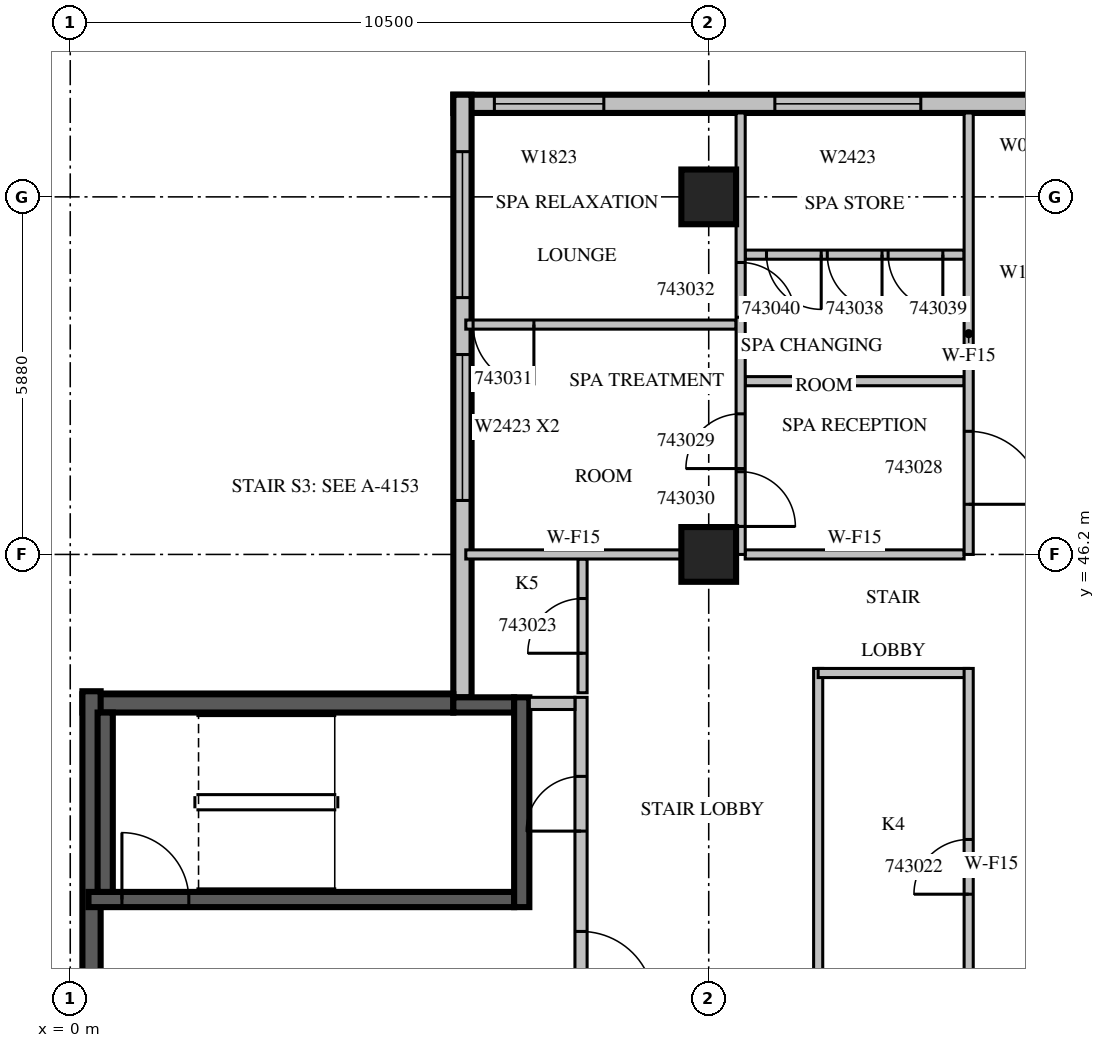
"""IFC4 building model, lengths in metres.
Left out: names, types, materials, properties, quantities, classifications, styles, units other than length and angle.
Written with IfcOpenShell. Run it as: python <this file> out.ifc"""

import sys

from ifc_helpers import new_model, si_unit, direction, frame, frame_2d, origin, origin_2d, place, context, subcontext, project, spatial, rectangle, extrude, source, transform, mapped, element, fill, save


model = new_model("IFC4")
c1 = context("Model", 3, precision=1e-05, world=origin(), true_north=direction((0.0, 1.0)))
c2 = subcontext(c1, "Body", "Model", "MODEL_VIEW")
j1 = project(units=[si_unit("LENGTHUNIT", "METRE"), si_unit("PLANEANGLEUNIT", "RADIAN")], contexts=[c1])
p1 = place(None, origin())
s1 = spatial("IfcSite", under=j1, at=p1, CompositionType="ELEMENT")
p2 = place(p1, origin())
s2 = spatial("IfcBuilding", under=s1, at=p2, CompositionType="ELEMENT")
p3 = place(p2, frame((0.0, 0.0, 196.8)))
s3 = spatial("IfcBuildingStorey", under=s2, at=p3, CompositionType="ELEMENT", Elevation=196.8)
m1 = source(origin(), c2, "Body", "SweptSolid", [
    extrude(rectangle(XDim=0.9, YDim=0.9, at=origin_2d()), origin(), (0.0, 0.0, 1.0), 3.8),
])
for number, where, z_axis, x_axis in (
    (1, (10.5, 46.2, 0.0), (0.0, 0.0, 1.0), (1.0, 0.0, 0.0)),
    (2, (10.5, 52.08, 0.0), (0.0, 0.0, 1.0), (1.0, 0.0, 0.0)),
):
    element("IfcColumn", number, at=place(p3, frame(where, z_axis=z_axis, x_axis=x_axis)), inside=s3, PredefinedType="COLUMN", context=c2, shape_type="MappedRepresentation", body=[
        mapped(m1, transform((0.0, 0.0, 0.0), scale=1.0)),
    ])
m2 = source(origin(), c2, "Body", "SweptSolid", [
    extrude(rectangle(XDim=10.5, YDim=0.3, at=frame_2d((5.25, 0.0))), origin(), (0.0, 0.0, 1.0), 3.4),
])
p4 = place(p3, frame((16.8, 53.61, 0.0), z_axis=(0.0, 0.0, 1.0), x_axis=(-1.0, 0.0, 0.0)))
e3 = element("IfcWall", 3, at=p4, inside=s3, PredefinedType="STANDARD", context=c2, shape_type="MappedRepresentation", body=[
    mapped(m2, transform((0.0, 0.0, 0.0), scale=1.0)),
])
m3 = source(origin(), c2, "Body", "SweptSolid", [
    extrude(rectangle(XDim=1.8, YDim=2.3, at=frame_2d((0.9, 1.15))), frame((0.0, 0.16, 0.0), z_axis=(0.0, -1.0, 0.0), x_axis=(1.0, 0.0, 0.0)), (0.0, 0.0, 1.0), 0.32),
])
p5 = place(p4, frame((8.025, 0.0, 0.6)))
e4 = element("IfcOpeningElement", 4, at=p5, cuts=e3, PredefinedType="OPENING", context=c2, shape_type="MappedRepresentation", body=[
    mapped(m3, transform((0.0, 0.0, 0.0), scale=1.0)),
])
m4 = source(origin(), c2, "Body", "SweptSolid", [
    extrude(rectangle(XDim=2.4, YDim=2.3, at=frame_2d((1.2, 1.15))), frame((0.0, 0.16, 0.0), z_axis=(0.0, -1.0, 0.0), x_axis=(1.0, 0.0, 0.0)), (0.0, 0.0, 1.0), 0.32),
])
p6 = place(p4, frame((2.812, 0.0, 0.6)))
e5 = element("IfcOpeningElement", 5, at=p6, cuts=e3, PredefinedType="OPENING", context=c2, shape_type="MappedRepresentation", body=[
    mapped(m4, transform((0.0, 0.0, 0.0), scale=1.0)),
])
m5 = source(origin(), c2, "Body", "SweptSolid", [
    extrude(rectangle(XDim=9.91, YDim=0.3, at=frame_2d((4.955, 0.0))), origin(), (0.0, 0.0, 1.0), 3.4),
])
p7 = place(p3, frame((6.45, 53.76, 0.0), z_axis=(0.0, 0.0, 1.0), x_axis=(0.0, -1.0, 0.0)))
e6 = element("IfcWall", 6, at=p7, inside=s3, PredefinedType="STANDARD", context=c2, shape_type="MappedRepresentation", body=[
    mapped(m5, transform((0.0, 0.0, 0.0), scale=1.0)),
])
p8 = place(p7, frame((4.272, 0.0, 0.6)))
e7 = element("IfcOpeningElement", 7, at=p8, cuts=e6, PredefinedType="OPENING", context=c2, shape_type="MappedRepresentation", body=[
    mapped(m4, transform((0.0, 0.0, 0.0), scale=1.0)),
])
p9 = place(p7, frame((0.936, 0.0, 0.6)))
e8 = element("IfcOpeningElement", 8, at=p9, cuts=e6, PredefinedType="OPENING", context=c2, shape_type="MappedRepresentation", body=[
    mapped(m4, transform((0.0, 0.0, 0.0), scale=1.0)),
])
m6 = source(origin(), c2, "Body", "SweptSolid", [
    extrude(rectangle(XDim=6.1, YDim=0.3, at=frame_2d((3.05, 0.0))), origin(), (0.0, 0.0, 1.0), 3.4),
])
p10 = place(p3, frame((6.3, 43.75, 0.0), z_axis=(0.0, 0.0, 1.0), x_axis=(-1.0, 0.0, 0.0)))
e9 = element("IfcWall", 9, at=p10, inside=s3, PredefinedType="SOLIDWALL", context=c2, shape_type="MappedRepresentation", body=[
    mapped(m6, transform((0.0, 0.0, 0.0), scale=1.0)),
])
m7 = source(origin(), c2, "Body", "SweptSolid", [
    extrude(rectangle(XDim=5.65, YDim=0.3, at=frame_2d((2.825, 0.0))), origin(), (0.0, 0.0, 1.0), 3.4),
])
p11 = place(p3, frame((0.35, 43.95, 0.0), z_axis=(0.0, 0.0, 1.0), x_axis=(0.0, -1.0, 0.0)))
e10 = element("IfcWall", 10, at=p11, inside=s3, PredefinedType="SOLIDWALL", context=c2, shape_type="MappedRepresentation", body=[
    mapped(m7, transform((0.0, 0.0, 0.0), scale=1.0)),
])
m8 = source(origin(), c2, "Body", "SweptSolid", [
    extrude(rectangle(XDim=7.0, YDim=0.25, at=frame_2d((3.5, 0.0))), origin(), (0.0, 0.0, 1.0), 3.4),
])
p12 = place(p3, frame((0.3, 40.525, 0.0), z_axis=(0.0, 0.0, 1.0), x_axis=(1.0, 0.0, 0.0)))
e11 = element("IfcWall", 11, at=p12, inside=s3, PredefinedType="SOLIDWALL", context=c2, shape_type="MappedRepresentation", body=[
    mapped(m8, transform((0.0, 0.0, 0.0), scale=1.0)),
])
m9 = source(origin(), c2, "Body", "SweptSolid", [
    extrude(rectangle(XDim=1.1, YDim=2.1, at=frame_2d((0.55, 1.05))), frame((0.0, 0.135, 0.0), z_axis=(0.0, -1.0, 0.0), x_axis=(1.0, 0.0, 0.0)), (0.0, 0.0, 1.0), 0.27),
])
p13 = place(p12, frame((0.55, 0.0, 0.0)))
e12 = element("IfcOpeningElement", 12, at=p13, cuts=e11, PredefinedType="OPENING", context=c2, shape_type="MappedRepresentation", body=[
    mapped(m9, transform((0.0, 0.0, 0.0), scale=1.0)),
])
m10 = source(origin(), c2, "Body", "SweptSolid", [
    extrude(rectangle(XDim=1.0, YDim=0.25, at=frame_2d((0.5, 0.0))), origin(), (0.0, 0.0, 1.0), 3.4),
])
p14 = place(p3, frame((6.3, 43.725, 0.0), z_axis=(0.0, 0.0, 1.0), x_axis=(1.0, 0.0, 0.0)))
e13 = element("IfcWall", 13, at=p14, inside=s3, PredefinedType="SOLIDWALL", context=c2, shape_type="MappedRepresentation", body=[
    mapped(m10, transform((0.0, 0.0, 0.0), scale=1.0)),
])
m11 = source(origin(), c2, "Body", "SweptSolid", [
    extrude(rectangle(XDim=3.45, YDim=0.25, at=frame_2d((1.725, 0.0))), origin(), (0.0, 0.0, 1.0), 3.4),
])
p15 = place(p3, frame((7.425, 40.4, 0.0), z_axis=(0.0, 0.0, 1.0), x_axis=(0.0, 1.0, 0.0)))
e14 = element("IfcWall", 14, at=p15, inside=s3, PredefinedType="SOLIDWALL", context=c2, shape_type="MappedRepresentation", body=[
    mapped(m11, transform((0.0, 0.0, 0.0), scale=1.0)),
])
m12 = source(origin(), c2, "Body", "SweptSolid", [
    extrude(rectangle(XDim=2.95, YDim=0.25, at=frame_2d((1.475, 0.0))), origin(), (0.0, 0.0, 1.0), 3.4),
])
p16 = place(p3, frame((0.575, 40.65, 0.0), z_axis=(0.0, 0.0, 1.0), x_axis=(0.0, 1.0, 0.0)))
e15 = element("IfcWall", 15, at=p16, inside=s3, PredefinedType="SOLIDWALL", context=c2, shape_type="MappedRepresentation", body=[
    mapped(m12, transform((0.0, 0.0, 0.0), scale=1.0)),
])
m13 = source(origin(), c2, "Body", "SweptSolid", [
    extrude(rectangle(XDim=5.45, YDim=0.2, at=frame_2d((2.725, 0.0))), origin(), (0.0, 0.0, 1.0), 3.4),
])
p17 = place(p3, frame((8.4, 38.4, 0.0), z_axis=(0.0, 0.0, 1.0), x_axis=(0.0, 1.0, 0.0)))
e16 = element("IfcWall", 16, at=p17, inside=s3, PredefinedType="PARTITIONING", context=c2, shape_type="MappedRepresentation", body=[
    mapped(m13, transform((0.0, 0.0, 0.0), scale=1.0)),
])
m14 = source(origin(), c2, "Body", "SweptSolid", [
    extrude(rectangle(XDim=1.2, YDim=2.1, at=frame_2d((0.6, 1.05))), frame((0.0, 0.11, 0.0), z_axis=(0.0, -1.0, 0.0), x_axis=(1.0, 0.0, 0.0)), (0.0, 0.0, 1.0), 0.22),
])
p18 = place(p17, frame((0.4, 0.0, 0.0)))
e17 = element("IfcOpeningElement", 17, at=p18, cuts=e16, PredefinedType="OPENING", context=c2, shape_type="MappedRepresentation", body=[
    mapped(m14, transform((0.0, 0.0, 0.0), scale=1.0)),
])
m15 = source(origin(), c2, "Body", "SweptSolid", [
    extrude(rectangle(XDim=0.9, YDim=2.1, at=frame_2d((0.45, 1.05))), frame((0.0, 0.11, 0.0), z_axis=(0.0, -1.0, 0.0), x_axis=(1.0, 0.0, 0.0)), (0.0, 0.0, 1.0), 0.22),
])
p19 = place(p17, frame((3.25, 0.0, 0.0)))
e18 = element("IfcOpeningElement", 18, at=p19, cuts=e16, PredefinedType="OPENING", context=c2, shape_type="MappedRepresentation", body=[
    mapped(m15, transform((0.0, 0.0, 0.0), scale=1.0)),
])
m16 = source(origin(), c2, "Body", "SweptSolid", [
    extrude(rectangle(XDim=0.75, YDim=0.2, at=frame_2d((0.375, 0.0))), origin(), (0.0, 0.0, 1.0), 3.4),
])
p20 = place(p3, frame((7.55, 43.75, 0.0), z_axis=(0.0, 0.0, 1.0), x_axis=(1.0, 0.0, 0.0)))
e19 = element("IfcWall", 19, at=p20, inside=s3, PredefinedType="PARTITIONING", context=c2, shape_type="MappedRepresentation", body=[
    mapped(m16, transform((0.0, 0.0, 0.0), scale=1.0)),
])
m17 = source(origin(), c2, "Body", "SweptSolid", [
    extrude(rectangle(XDim=6.45, YDim=0.15, at=frame_2d((3.225, 0.0))), origin(), (0.0, 0.0, 1.0), 3.4),
])
p21 = place(p3, frame((12.3, 44.325, 0.0), z_axis=(0.0, 0.0, 1.0), x_axis=(0.0, -1.0, 0.0)))
e20 = element("IfcWall", 20, at=p21, inside=s3, PredefinedType="PARTITIONING", context=c2, shape_type="MappedRepresentation", body=[
    mapped(m17, transform((0.0, 0.0, 0.0), scale=1.0)),
])
m18 = source(origin(), c2, "Body", "SweptSolid", [
    extrude(rectangle(XDim=2.475, YDim=0.15, at=frame_2d((1.238, 0.0))), origin(), (0.0, 0.0, 1.0), 3.4),
])
p22 = place(p3, frame((14.775, 44.25, 0.0), z_axis=(0.0, 0.0, 1.0), x_axis=(-1.0, 0.0, 0.0)))
e21 = element("IfcWall", 21, at=p22, inside=s3, PredefinedType="PARTITIONING", context=c2, shape_type="MappedRepresentation", body=[
    mapped(m18, transform((0.0, 0.0, 0.0), scale=1.0)),
])
p23 = place(p3, frame((14.775, 37.875, 0.0), z_axis=(0.0, 0.0, 1.0), x_axis=(0.0, 1.0, 0.0)))
e22 = element("IfcWall", 22, at=p23, inside=s3, PredefinedType="PARTITIONING", context=c2, shape_type="MappedRepresentation", body=[
    mapped(m17, transform((0.0, 0.0, 0.0), scale=1.0)),
])
m19 = source(origin(), c2, "Body", "SweptSolid", [
    extrude(rectangle(XDim=0.9, YDim=2.1, at=frame_2d((0.45, 1.05))), frame((0.0, 0.085, 0.0), z_axis=(0.0, -1.0, 0.0), x_axis=(1.0, 0.0, 0.0)), (0.0, 0.0, 1.0), 0.17),
])
p24 = place(p23, frame((2.737, 0.0, 0.0)))
e23 = element("IfcOpeningElement", 23, at=p24, cuts=e22, PredefinedType="OPENING", context=c2, shape_type="MappedRepresentation", body=[
    mapped(m19, transform((0.0, 0.0, 0.0), scale=1.0)),
])
m20 = source(origin(), c2, "Body", "SweptSolid", [
    extrude(rectangle(XDim=2.2, YDim=0.15, at=frame_2d((1.1, 0.0))), origin(), (0.0, 0.0, 1.0), 3.4),
])
p25 = place(p3, frame((8.425, 43.925, 0.0), z_axis=(0.0, 0.0, 1.0), x_axis=(0.0, 1.0, 0.0)))
e24 = element("IfcWall", 24, at=p25, inside=s3, PredefinedType="PARTITIONING", context=c2, shape_type="MappedRepresentation", body=[
    mapped(m20, transform((0.0, 0.0, 0.0), scale=1.0)),
])
p26 = place(p25, frame((0.65, 0.0, 0.0)))
e25 = element("IfcOpeningElement", 25, at=p26, cuts=e24, PredefinedType="OPENING", context=c2, shape_type="MappedRepresentation", body=[
    mapped(m19, transform((0.0, 0.0, 0.0), scale=1.0)),
])
m21 = source(origin(), c2, "Body", "SweptSolid", [
    extrude(rectangle(XDim=4.445, YDim=0.15, at=frame_2d((2.223, 0.0))), origin(), (0.0, 0.0, 1.0), 3.4),
])
p27 = place(p3, frame((10.95, 49.98, 0.0), z_axis=(0.0, 0.0, 1.0), x_axis=(-1.0, 0.0, 0.0)))
e26 = element("IfcWall", 26, at=p27, inside=s3, PredefinedType="PARTITIONING", context=c2, shape_type="MappedRepresentation", body=[
    mapped(m21, transform((0.0, 0.0, 0.0), scale=1.0)),
])
m22 = source(origin(), c2, "Body", "SweptSolid", [
    extrude(rectangle(XDim=1.0, YDim=2.1, at=frame_2d((0.5, 1.05))), frame((0.0, 0.085, 0.0), z_axis=(0.0, -1.0, 0.0), x_axis=(1.0, 0.0, 0.0)), (0.0, 0.0, 1.0), 0.17),
])
p28 = place(p27, frame((3.325, 0.0, 0.0)))
e27 = element("IfcOpeningElement", 27, at=p28, cuts=e26, PredefinedType="OPENING", context=c2, shape_type="MappedRepresentation", body=[
    mapped(m22, transform((0.0, 0.0, 0.0), scale=1.0)),
])
m23 = source(origin(), c2, "Body", "SweptSolid", [
    extrude(rectangle(XDim=3.6, YDim=0.15, at=frame_2d((1.8, 0.0))), origin(), (0.0, 0.0, 1.0), 3.4),
])
p29 = place(p3, frame((14.7, 49.049, 0.0), z_axis=(0.0, 0.0, 1.0), x_axis=(-1.0, 0.0, 0.0)))
e28 = element("IfcWall", 28, at=p29, inside=s3, PredefinedType="PARTITIONING", context=c2, shape_type="MappedRepresentation", body=[
    mapped(m23, transform((0.0, 0.0, 0.0), scale=1.0)),
])
p30 = place(p3, frame((14.7, 51.13, 0.0), z_axis=(0.0, 0.0, 1.0), x_axis=(-1.0, 0.0, 0.0)))
e29 = element("IfcWall", 29, at=p30, inside=s3, PredefinedType="PARTITIONING", context=c2, shape_type="MappedRepresentation", body=[
    mapped(m23, transform((0.0, 0.0, 0.0), scale=1.0)),
])
p31 = place(p30, frame((1.35, 0.0, 0.0)))
e30 = element("IfcOpeningElement", 30, at=p31, cuts=e29, PredefinedType="OPENING", context=c2, shape_type="MappedRepresentation", body=[
    mapped(m19, transform((0.0, 0.0, 0.0), scale=1.0)),
])
p32 = place(p30, frame((0.35, 0.0, 0.0)))
e31 = element("IfcOpeningElement", 31, at=p32, cuts=e29, PredefinedType="OPENING", context=c2, shape_type="MappedRepresentation", body=[
    mapped(m19, transform((0.0, 0.0, 0.0), scale=1.0)),
])
p33 = place(p30, frame((2.35, 0.0, 0.0)))
e32 = element("IfcOpeningElement", 32, at=p33, cuts=e29, PredefinedType="OPENING", context=c2, shape_type="MappedRepresentation", body=[
    mapped(m19, transform((0.0, 0.0, 0.0), scale=1.0)),
])
m24 = source(origin(), c2, "Body", "SweptSolid", [
    extrude(rectangle(XDim=3.546, YDim=0.15, at=frame_2d((1.773, 0.0))), origin(), (0.0, 0.0, 1.0), 3.4),
])
p34 = place(p3, frame((10.051, 46.2, 0.0), z_axis=(0.0, 0.0, 1.0), x_axis=(-1.0, 0.0, 0.0)))
e33 = element("IfcWall", 33, at=p34, inside=s3, PredefinedType="PARTITIONING", context=c2, shape_type="MappedRepresentation", body=[
    mapped(m24, transform((0.0, 0.0, 0.0), scale=1.0)),
])
p35 = place(p3, frame((14.7, 46.2, 0.0), z_axis=(0.0, 0.0, 1.0), x_axis=(-1.0, 0.0, 0.0)))
e34 = element("IfcWall", 34, at=p35, inside=s3, PredefinedType="PARTITIONING", context=c2, shape_type="MappedRepresentation", body=[
    mapped(m23, transform((0.0, 0.0, 0.0), scale=1.0)),
])
m25 = source(origin(), c2, "Body", "SweptSolid", [
    extrude(rectangle(XDim=7.26, YDim=0.15, at=frame_2d((3.63, 0.0))), origin(), (0.0, 0.0, 1.0), 3.4),
])
p36 = place(p3, frame((11.025, 46.2, 0.0), z_axis=(0.0, 0.0, 1.0), x_axis=(0.0, 1.0, 0.0)))
e35 = element("IfcWall", 35, at=p36, inside=s3, PredefinedType="PARTITIONING", context=c2, shape_type="MappedRepresentation", body=[
    mapped(m25, transform((0.0, 0.0, 0.0), scale=1.0)),
])
p37 = place(p36, frame((1.412, 0.0, 0.0)))
e36 = element("IfcOpeningElement", 36, at=p37, cuts=e35, PredefinedType="OPENING", context=c2, shape_type="MappedRepresentation", body=[
    mapped(m19, transform((0.0, 0.0, 0.0), scale=1.0)),
])
p38 = place(p36, frame((0.46, 0.0, 0.0)))
e37 = element("IfcOpeningElement", 37, at=p38, cuts=e35, PredefinedType="OPENING", context=c2, shape_type="MappedRepresentation", body=[
    mapped(m19, transform((0.0, 0.0, 0.0), scale=1.0)),
])
p39 = place(p36, frame((3.901, 0.0, 0.0)))
e38 = element("IfcOpeningElement", 38, at=p39, cuts=e35, PredefinedType="OPENING", context=c2, shape_type="MappedRepresentation", body=[
    mapped(m19, transform((0.0, 0.0, 0.0), scale=1.0)),
])
p40 = place(p3, frame((14.775, 46.2, 0.0), z_axis=(0.0, 0.0, 1.0), x_axis=(0.0, 1.0, 0.0)))
e39 = element("IfcWall", 39, at=p40, inside=s3, PredefinedType="PARTITIONING", context=c2, shape_type="MappedRepresentation", body=[
    mapped(m25, transform((0.0, 0.0, 0.0), scale=1.0)),
])
m26 = source(origin(), c2, "Body", "SweptSolid", [
    extrude(rectangle(XDim=1.2, YDim=2.1, at=frame_2d((0.6, 1.05))), frame((0.0, 0.085, 0.0), z_axis=(0.0, -1.0, 0.0), x_axis=(1.0, 0.0, 0.0)), (0.0, 0.0, 1.0), 0.17),
])
p41 = place(p40, frame((0.825, 0.0, 0.0)))
e40 = element("IfcOpeningElement", 40, at=p41, cuts=e39, PredefinedType="OPENING", context=c2, shape_type="MappedRepresentation", body=[
    mapped(m26, transform((0.0, 0.0, 0.0), scale=1.0)),
])
m27 = source(origin(), c2, "Body", "SweptSolid", [
    extrude(rectangle(XDim=1.8, YDim=2.3, at=frame_2d((0.9, 1.15))), frame((0.0, 0.03, 0.0), z_axis=(0.0, -1.0, 0.0), x_axis=(1.0, 0.0, 0.0)), (0.0, 0.0, 1.0), 0.06),
])
p42 = place(p5, origin())
e41 = element("IfcWindow", 41, at=p42, inside=s3, PartitioningType="SINGLE_PANEL", PredefinedType="WINDOW", context=c2, shape_type="MappedRepresentation", body=[
    mapped(m27, transform((0.0, 0.0, 0.0), scale=1.0)),
])
fill(e4, e41)
m28 = source(origin(), c2, "Body", "SweptSolid", [
    extrude(rectangle(XDim=2.4, YDim=2.3, at=frame_2d((1.2, 1.15))), frame((0.0, 0.03, 0.0), z_axis=(0.0, -1.0, 0.0), x_axis=(1.0, 0.0, 0.0)), (0.0, 0.0, 1.0), 0.06),
])
p43 = place(p6, origin())
e42 = element("IfcWindow", 42, at=p43, inside=s3, PartitioningType="SINGLE_PANEL", PredefinedType="WINDOW", context=c2, shape_type="MappedRepresentation", body=[
    mapped(m28, transform((0.0, 0.0, 0.0), scale=1.0)),
])
fill(e5, e42)
p44 = place(p8, origin())
e43 = element("IfcWindow", 43, at=p44, inside=s3, PartitioningType="SINGLE_PANEL", PredefinedType="WINDOW", context=c2, shape_type="MappedRepresentation", body=[
    mapped(m28, transform((0.0, 0.0, 0.0), scale=1.0)),
])
fill(e7, e43)
p45 = place(p9, origin())
e44 = element("IfcWindow", 44, at=p45, inside=s3, PartitioningType="SINGLE_PANEL", PredefinedType="WINDOW", context=c2, shape_type="MappedRepresentation", body=[
    mapped(m28, transform((0.0, 0.0, 0.0), scale=1.0)),
])
fill(e8, e44)
m29 = source(origin(), c2, "Body", "SweptSolid", [
    extrude(rectangle(XDim=1.1, YDim=2.1, at=frame_2d((0.55, 1.05))), frame((0.0, 0.025, 0.0), z_axis=(0.0, -1.0, 0.0), x_axis=(1.0, 0.0, 0.0)), (0.0, 0.0, 1.0), 0.05),
])
p46 = place(p13, origin())
e45 = element("IfcDoor", 45, at=p46, inside=s3, OperationType="SINGLE_SWING_LEFT", PredefinedType="DOOR", context=c2, shape_type="MappedRepresentation", body=[
    mapped(m29, transform((0.0, 0.0, 0.0), scale=1.0)),
])
fill(e12, e45)
m30 = source(origin(), c2, "Body", "SweptSolid", [
    extrude(rectangle(XDim=1.2, YDim=2.1, at=frame_2d((0.6, 1.05))), frame((0.0, 0.025, 0.0), z_axis=(0.0, -1.0, 0.0), x_axis=(1.0, 0.0, 0.0)), (0.0, 0.0, 1.0), 0.05),
])
p47 = place(p18, origin())
e46 = element("IfcDoor", 46, at=p47, inside=s3, OperationType="SINGLE_SWING_RIGHT", PredefinedType="DOOR", context=c2, shape_type="MappedRepresentation", body=[
    mapped(m30, transform((0.0, 0.0, 0.0), scale=1.0)),
])
fill(e17, e46)
m31 = source(origin(), c2, "Body", "SweptSolid", [
    extrude(rectangle(XDim=0.9, YDim=2.1, at=frame_2d((0.45, 1.05))), frame((0.0, 0.025, 0.0), z_axis=(0.0, -1.0, 0.0), x_axis=(1.0, 0.0, 0.0)), (0.0, 0.0, 1.0), 0.05),
])
p48 = place(p19, origin())
e47 = element("IfcDoor", 47, at=p48, inside=s3, OperationType="SINGLE_SWING_LEFT", PredefinedType="DOOR", context=c2, shape_type="MappedRepresentation", body=[
    mapped(m31, transform((0.0, 0.0, 0.0), scale=1.0)),
])
fill(e18, e47)
p49 = place(p24, origin())
e48 = element("IfcDoor", 48, at=p49, inside=s3, OperationType="SINGLE_SWING_LEFT", PredefinedType="DOOR", context=c2, shape_type="MappedRepresentation", body=[
    mapped(m31, transform((0.0, 0.0, 0.0), scale=1.0)),
])
fill(e23, e48)
p50 = place(p26, origin())
e49 = element("IfcDoor", 49, at=p50, inside=s3, OperationType="SINGLE_SWING_LEFT", PredefinedType="DOOR", context=c2, shape_type="MappedRepresentation", body=[
    mapped(m31, transform((0.0, 0.0, 0.0), scale=1.0)),
])
fill(e25, e49)
p51 = place(p41, origin())
e50 = element("IfcDoor", 50, at=p51, inside=s3, OperationType="SINGLE_SWING_RIGHT", PredefinedType="DOOR", context=c2, shape_type="MappedRepresentation", body=[
    mapped(m30, transform((0.0, 0.0, 0.0), scale=1.0)),
])
fill(e40, e50)
p52 = place(p37, origin())
e51 = element("IfcDoor", 51, at=p52, inside=s3, OperationType="SINGLE_SWING_LEFT", PredefinedType="DOOR", context=c2, shape_type="MappedRepresentation", body=[
    mapped(m31, transform((0.0, 0.0, 0.0), scale=1.0)),
])
fill(e36, e51)
p53 = place(p38, origin())
e52 = element("IfcDoor", 52, at=p53, inside=s3, OperationType="SINGLE_SWING_RIGHT", PredefinedType="DOOR", context=c2, shape_type="MappedRepresentation", body=[
    mapped(m31, transform((0.0, 0.0, 0.0), scale=1.0)),
])
fill(e37, e52)
m32 = source(origin(), c2, "Body", "SweptSolid", [
    extrude(rectangle(XDim=1.0, YDim=2.1, at=frame_2d((0.5, 1.05))), frame((0.0, 0.025, 0.0), z_axis=(0.0, -1.0, 0.0), x_axis=(1.0, 0.0, 0.0)), (0.0, 0.0, 1.0), 0.05),
])
p54 = place(p28, origin())
e53 = element("IfcDoor", 53, at=p54, inside=s3, OperationType="SINGLE_SWING_LEFT", PredefinedType="DOOR", context=c2, shape_type="MappedRepresentation", body=[
    mapped(m32, transform((0.0, 0.0, 0.0), scale=1.0)),
])
fill(e27, e53)
p55 = place(p39, origin())
e54 = element("IfcDoor", 54, at=p55, inside=s3, OperationType="SINGLE_SWING_RIGHT", PredefinedType="DOOR", context=c2, shape_type="MappedRepresentation", body=[
    mapped(m31, transform((0.0, 0.0, 0.0), scale=1.0)),
])
fill(e38, e54)
p56 = place(p31, origin())
e55 = element("IfcDoor", 55, at=p56, inside=s3, OperationType="SINGLE_SWING_LEFT", PredefinedType="DOOR", context=c2, shape_type="MappedRepresentation", body=[
    mapped(m31, transform((0.0, 0.0, 0.0), scale=1.0)),
])
fill(e30, e55)
p57 = place(p32, origin())
e56 = element("IfcDoor", 56, at=p57, inside=s3, OperationType="SINGLE_SWING_LEFT", PredefinedType="DOOR", context=c2, shape_type="MappedRepresentation", body=[
    mapped(m31, transform((0.0, 0.0, 0.0), scale=1.0)),
])
fill(e31, e56)
p58 = place(p33, origin())
e57 = element("IfcDoor", 57, at=p58, inside=s3, OperationType="SINGLE_SWING_LEFT", PredefinedType="DOOR", context=c2, shape_type="MappedRepresentation", body=[
    mapped(m31, transform((0.0, 0.0, 0.0), scale=1.0)),
])
fill(e32, e57)
save(model, sys.argv[1])
